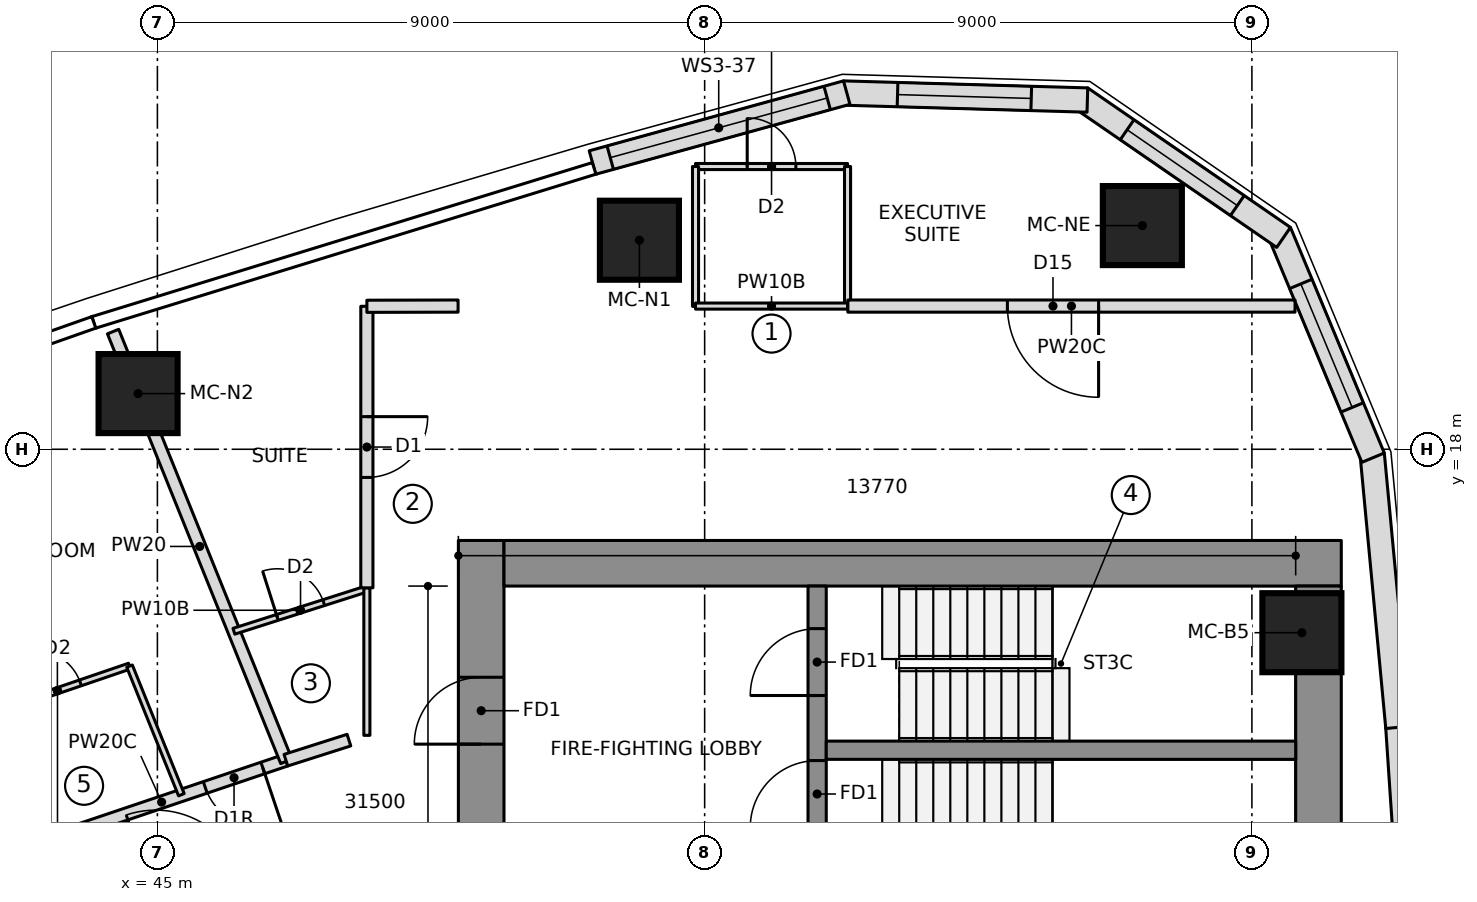
"""IFC4 building model, lengths in metres.
Left out: names, types, materials, properties, quantities, classifications, styles, units other than length and angle.
Written with IfcOpenShell. Run it as: python <this file> out.ifc"""

import sys

from ifc_helpers import new_model, si_unit, direction, frame, frame_2d, origin, origin_2d, place, context, subcontext, project, spatial, polyline, rectangle, outline, extrude, element, fill, save


model = new_model("IFC4")
c1 = context("Model", 3, precision=1e-05, world=origin(), true_north=direction((0.0, 1.0)))
c2 = subcontext(c1, "Body", "Model", "MODEL_VIEW")
j1 = project(units=[si_unit("LENGTHUNIT", "METRE"), si_unit("PLANEANGLEUNIT", "RADIAN")], contexts=[c1])
p1 = place(None, origin())
s1 = spatial("IfcSite", under=j1, at=p1, CompositionType="ELEMENT")
p2 = place(p1, origin())
s2 = spatial("IfcBuilding", under=s1, at=p2, CompositionType="ELEMENT")
p3 = place(p2, frame((0.0, 0.0, 179.05)))
s3 = spatial("IfcBuildingStorey", under=s2, at=p3, CompositionType="ELEMENT", Elevation=179.05)
p4 = place(p3, frame((50.325, 6.65, 0.0), z_axis=(0.0, 0.0, 1.0), x_axis=(0.0, 1.0, 0.0)))
e1 = element("IfcWall", 1, at=p4, inside=s3, PredefinedType="SHEAR", context=c2, shape_type="SweptSolid", body=[
    extrude(rectangle(XDim=9.85, YDim=0.75, at=frame_2d((4.925, 0.0))), origin(), (0.0, 0.0, 1.0), 3.55),
])
p5 = place(p4, frame((6.5, 0.0, 0.0)))
e2 = element("IfcOpeningElement", 2, at=p5, cuts=e1, PredefinedType="OPENING", context=c2, shape_type="SweptSolid", body=[
    extrude(rectangle(XDim=1.1, YDim=2.1, at=frame_2d((0.55, 1.05))), frame((0.0, 0.385, 0.0), z_axis=(0.0, -1.0, 0.0), x_axis=(1.0, 0.0, 0.0)), (0.0, 0.0, 1.0), 0.77),
])
p6 = place(p3, frame((50.7, 16.125, 0.0), z_axis=(0.0, 0.0, 1.0), x_axis=(1.0, 0.0, 0.0)))
e3 = element("IfcWall", 3, at=p6, inside=s3, PredefinedType="SHEAR", context=c2, shape_type="SweptSolid", body=[
    extrude(rectangle(XDim=13.77, YDim=0.75, at=frame_2d((6.885, 0.0))), origin(), (0.0, 0.0, 1.0), 3.55),
])
p7 = place(p3, frame((64.095, 8.099, 0.0), z_axis=(0.0, 0.0, 1.0), x_axis=(0.0, 1.0, 0.0)))
e4 = element("IfcWall", 4, at=p7, inside=s3, PredefinedType="SHEAR", context=c2, shape_type="SweptSolid", body=[
    extrude(rectangle(XDim=7.651, YDim=0.75, at=frame_2d((3.825, 0.0))), origin(), (0.0, 0.0, 1.0), 3.55),
])
p8 = place(p3, frame((55.85, 10.35, 0.0), z_axis=(0.0, 0.0, 1.0), x_axis=(0.0, 1.0, 0.0)))
e5 = element("IfcWall", 5, at=p8, inside=s3, PredefinedType="SHEAR", context=c2, shape_type="SweptSolid", body=[
    extrude(rectangle(XDim=5.4, YDim=0.3, at=frame_2d((2.7, 0.0))), origin(), (0.0, 0.0, 1.0), 3.55),
])
p9 = place(p8, frame((1.43, 0.0, 0.0)))
e6 = element("IfcOpeningElement", 6, at=p9, cuts=e5, PredefinedType="OPENING", context=c2, shape_type="SweptSolid", body=[
    extrude(rectangle(XDim=1.1, YDim=2.1, at=frame_2d((0.55, 1.05))), frame((0.0, 0.16, 0.0), z_axis=(0.0, -1.0, 0.0), x_axis=(1.0, 0.0, 0.0)), (0.0, 0.0, 1.0), 0.32),
])
p10 = place(p8, frame((3.6, 0.0, 0.0)))
e7 = element("IfcOpeningElement", 7, at=p10, cuts=e5, PredefinedType="OPENING", context=c2, shape_type="SweptSolid", body=[
    extrude(rectangle(XDim=1.1, YDim=2.1, at=frame_2d((0.55, 1.05))), frame((0.0, 0.16, 0.0), z_axis=(0.0, -1.0, 0.0), x_axis=(1.0, 0.0, 0.0)), (0.0, 0.0, 1.0), 0.32),
])
p11 = place(p3, frame((56.0, 13.05, 0.0), z_axis=(0.0, 0.0, 1.0), x_axis=(1.0, 0.0, 0.0)))
e8 = element("IfcWall", 8, at=p11, inside=s3, PredefinedType="SHEAR", context=c2, shape_type="SweptSolid", body=[
    extrude(rectangle(XDim=7.72, YDim=0.3, at=frame_2d((3.86, 0.0))), origin(), (0.0, 0.0, 1.0), 3.55),
])
for number, where, z_axis, x_axis in (
    (9, (63.822, 14.983, 0.0), (0.0, 0.0, 1.0), (1.0, 0.0, 0.0)),
    (10, (61.198, 21.679, 0.0), (0.0, 0.0, 1.0), (1.0, 0.0, 0.0)),
    (11, (52.927, 21.438, 0.0), (0.0, 0.0, 1.0), (1.0, 0.0, 0.0)),
    (12, (44.683, 18.916, 0.0), (0.0, 0.0, 1.0), (1.0, 0.0, 0.0)),
):
    element("IfcColumn", number, at=place(p3, frame(where, z_axis=z_axis, x_axis=x_axis)), inside=s3, PredefinedType="COLUMN", context=c2, shape_type="SweptSolid", body=[
        extrude(rectangle(XDim=1.3, YDim=1.3, at=origin_2d()), origin(), (0.0, 0.0, 1.0), 3.55),
    ])
p12 = place(p3, frame((65.7, 8.958, 0.0), z_axis=(0.0, 0.0, 1.0), x_axis=(-0.066905935948, 0.997759287471, 0.0)))
e13 = element("IfcWall", 13, at=p12, inside=s3, PredefinedType="NOTDEFINED", context=c2, shape_type="SweptSolid", body=[
    extrude(outline(polyline([(-0.003, -0.2), (4.484, -0.2), (4.478, 0.2), (0.003, 0.2), (-0.003, -0.2)])), origin(), (0.0, 0.0, 1.0), 3.25),
])
p13 = place(p3, frame((65.401, 13.429, 0.0), z_axis=(0.0, 0.0, 1.0), x_axis=(-0.093605694738, 0.995609348044, 0.0)))
e14 = element("IfcWall", 14, at=p13, inside=s3, PredefinedType="NOTDEFINED", context=c2, shape_type="SweptSolid", body=[
    extrude(outline(polyline([(-0.003, -0.2), (4.511, -0.2), (4.451, 0.2), (0.003, 0.2), (-0.003, -0.2)])), origin(), (0.0, 0.0, 1.0), 3.25),
])
p14 = place(p3, frame((64.981, 17.89, 0.0), z_axis=(0.0, 0.0, 1.0), x_axis=(-0.383997619794, 0.923334082547, 0.0)))
e15 = element("IfcWall", 15, at=p14, inside=s3, PredefinedType="NOTDEFINED", context=c2, shape_type="SweptSolid", body=[
    extrude(outline(polyline([(-0.03, -0.2), (3.988, -0.2), (3.87, 0.2), (0.03, 0.2), (-0.03, -0.2)])), origin(), (0.0, 0.0, 1.0), 3.25),
])
p15 = place(p14, frame((0.865, 0.0, 0.6)))
e16 = element("IfcOpeningElement", 16, at=p15, cuts=e15, PredefinedType="OPENING", context=c2, shape_type="SweptSolid", body=[
    extrude(outline(polyline([(0.0, 1.35), (0.084, 1.771), (0.322, 2.128), (0.679, 2.366), (1.1, 2.45), (1.521, 2.366), (1.878, 2.128), (2.116, 1.771), (2.2, 1.35), (2.2, 1.1), (2.116, 0.679), (1.878, 0.322), (1.521, 0.084), (1.1, 0.0), (0.679, 0.084), (0.322, 0.322), (0.084, 0.679), (0.0, 1.1), (0.0, 1.35)])), frame((0.0, 0.21, 0.0), z_axis=(0.0, -1.0, 0.0), x_axis=(1.0, 0.0, 0.0)), (0.0, 0.0, 1.0), 0.42),
])
p16 = place(p3, frame((63.472, 21.518, 0.0), z_axis=(0.0, 0.0, 1.0), x_axis=(-0.823806162588, 0.566871596115, 0.0)))
e17 = element("IfcWall", 17, at=p16, inside=s3, PredefinedType="NOTDEFINED", context=c2, shape_type="SweptSolid", body=[
    extrude(outline(polyline([(-0.059, -0.2), (3.988, -0.2), (3.87, 0.2), (0.059, 0.2), (-0.059, -0.2)])), origin(), (0.0, 0.0, 1.0), 3.25),
])
p17 = place(p16, frame((0.865, 0.0, 0.6)))
e18 = element("IfcOpeningElement", 18, at=p17, cuts=e17, PredefinedType="OPENING", context=c2, shape_type="SweptSolid", body=[
    extrude(outline(polyline([(0.0, 1.35), (0.084, 1.771), (0.322, 2.128), (0.679, 2.366), (1.1, 2.45), (1.521, 2.366), (1.878, 2.128), (2.116, 1.771), (2.2, 1.35), (2.2, 1.1), (2.116, 0.679), (1.878, 0.322), (1.521, 0.084), (1.1, 0.0), (0.679, 0.084), (0.322, 0.322), (0.084, 0.679), (0.0, 1.1), (0.0, 1.35)])), frame((0.0, 0.21, 0.0), z_axis=(0.0, -1.0, 0.0), x_axis=(1.0, 0.0, 0.0)), (0.0, 0.0, 1.0), 0.42),
])
p18 = place(p3, frame((60.236, 23.745, 0.0), z_axis=(0.0, 0.0, 1.0), x_axis=(-0.999587920197, 0.028705222472, 0.0)))
e19 = element("IfcWall", 19, at=p18, inside=s3, PredefinedType="NOTDEFINED", context=c2, shape_type="SweptSolid", body=[
    extrude(outline(polyline([(-0.059, -0.2), (3.959, -0.2), (3.9, 0.2), (0.059, 0.2), (-0.059, -0.2)])), origin(), (0.0, 0.0, 1.0), 3.25),
])
p19 = place(p18, frame((0.865, 0.0, 0.6)))
e20 = element("IfcOpeningElement", 20, at=p19, cuts=e19, PredefinedType="OPENING", context=c2, shape_type="SweptSolid", body=[
    extrude(outline(polyline([(0.0, 1.35), (0.084, 1.771), (0.322, 2.128), (0.679, 2.366), (1.1, 2.45), (1.521, 2.366), (1.878, 2.128), (2.116, 1.771), (2.2, 1.35), (2.2, 1.1), (2.116, 0.679), (1.878, 0.322), (1.521, 0.084), (1.1, 0.0), (0.679, 0.084), (0.322, 0.322), (0.084, 0.679), (0.0, 1.1), (0.0, 1.35)])), frame((0.0, 0.21, 0.0), z_axis=(0.0, -1.0, 0.0), x_axis=(1.0, 0.0, 0.0)), (0.0, 0.0, 1.0), 0.42),
])
p20 = place(p3, frame((56.308, 23.858, 0.0), z_axis=(0.0, 0.0, 1.0), x_axis=(-0.964205755089, -0.265155165617, 0.0)))
e21 = element("IfcWall", 21, at=p20, inside=s3, PredefinedType="NOTDEFINED", context=c2, shape_type="SweptSolid", body=[
    extrude(outline(polyline([(-0.03, -0.2), (4.307, -0.2), (4.307, 0.2), (0.03, 0.2), (-0.03, -0.2)])), origin(), (0.0, 0.0, 1.0), 3.25),
])
p21 = place(p20, frame((0.303, 0.0, 0.9)))
e22 = element("IfcOpeningElement", 22, at=p21, cuts=e21, PredefinedType="OPENING", context=c2, shape_type="SweptSolid", body=[
    extrude(rectangle(XDim=3.7, YDim=1.8, at=frame_2d((1.85, 0.9))), frame((0.0, 0.21, 0.0), z_axis=(0.0, -1.0, 0.0), x_axis=(1.0, 0.0, 0.0)), (0.0, 0.0, 1.0), 0.42),
])
p22 = place(p3, frame((53.85, 22.65, 0.0), z_axis=(0.0, 0.0, 1.0), x_axis=(1.0, 0.0, 0.0)))
e23 = element("IfcWall", 23, at=p22, inside=s3, PredefinedType="PARTITIONING", context=c2, shape_type="SweptSolid", body=[
    extrude(rectangle(XDim=2.5, YDim=0.1, at=frame_2d((1.25, 0.0))), origin(), (0.0, 0.0, 1.0), 3.25),
])
p23 = place(p22, frame((0.85, 0.0, 0.0)))
e24 = element("IfcOpeningElement", 24, at=p23, cuts=e23, PredefinedType="OPENING", context=c2, shape_type="SweptSolid", body=[
    extrude(rectangle(XDim=0.8, YDim=2.1, at=frame_2d((0.4, 1.05))), frame((0.0, 0.06, 0.0), z_axis=(0.0, -1.0, 0.0), x_axis=(1.0, 0.0, 0.0)), (0.0, 0.0, 1.0), 0.12),
])
for number, where, z_axis, x_axis in (
    (25, (56.35, 22.65, 0.0), (0.0, 0.0, 1.0), (0.0, -1.0, 0.0)),
    (26, (53.85, 20.35, 0.0), (0.0, 0.0, 1.0), (0.0, 1.0, 0.0)),
):
    element("IfcWall", number, at=place(p3, frame(where, z_axis=z_axis, x_axis=x_axis)), inside=s3, PredefinedType="PARTITIONING", context=c2, shape_type="SweptSolid", body=[
        extrude(rectangle(XDim=2.3, YDim=0.1, at=frame_2d((1.15, 0.0))), origin(), (0.0, 0.0, 1.0), 3.25),
    ])
p24 = place(p3, frame((47.113, 12.886, 0.0), z_axis=(0.0, 0.0, 1.0), x_axis=(-0.947550995841, -0.319604615549, 0.0)))
e27 = element("IfcWall", 27, at=p24, inside=s3, PredefinedType="PARTITIONING", context=c2, shape_type="SweptSolid", body=[
    extrude(rectangle(XDim=4.314, YDim=0.2, at=frame_2d((2.157, 0.0))), origin(), (0.0, 0.0, 1.0), 3.25),
])
p25 = place(p24, frame((0.4, 0.0, 0.0)))
e28 = element("IfcOpeningElement", 28, at=p25, cuts=e27, PredefinedType="OPENING", context=c2, shape_type="SweptSolid", body=[
    extrude(rectangle(XDim=1.0, YDim=2.1, at=frame_2d((0.5, 1.05))), frame((0.0, 0.11, 0.0), z_axis=(0.0, -1.0, 0.0), x_axis=(1.0, 0.0, 0.0)), (0.0, 0.0, 1.0), 0.22),
])
p26 = place(p3, frame((42.172, 13.625, 0.0), z_axis=(0.0, 0.0, 1.0), x_axis=(0.946406575113, 0.322977699822, 0.0)))
e29 = element("IfcWall", 29, at=p26, inside=s3, PredefinedType="PARTITIONING", context=c2, shape_type="SweptSolid", body=[
    extrude(rectangle(XDim=2.504, YDim=0.1, at=frame_2d((1.252, 0.0))), origin(), (0.0, 0.0, 1.0), 3.25),
])
p27 = place(p26, frame((0.85, 0.0, 0.0)))
e30 = element("IfcOpeningElement", 30, at=p27, cuts=e29, PredefinedType="OPENING", context=c2, shape_type="SweptSolid", body=[
    extrude(rectangle(XDim=0.8, YDim=2.1, at=frame_2d((0.4, 1.05))), frame((0.0, 0.06, 0.0), z_axis=(0.0, -1.0, 0.0), x_axis=(1.0, 0.0, 0.0)), (0.0, 0.0, 1.0), 0.12),
])
p28 = place(p3, frame((44.542, 14.434, 0.0), z_axis=(0.0, 0.0, 1.0), x_axis=(0.373917841166, -0.927461831052, 0.0)))
e31 = element("IfcWall", 31, at=p28, inside=s3, PredefinedType="PARTITIONING", context=c2, shape_type="SweptSolid", body=[
    extrude(rectangle(XDim=2.281, YDim=0.1, at=frame_2d((1.14, 0.0))), origin(), (0.0, 0.0, 1.0), 3.25),
])
p29 = place(p3, frame((47.121, 12.867, 0.0), z_axis=(0.0, 0.0, 1.0), x_axis=(-0.373907892596, 0.92746584188, 0.0)))
e32 = element("IfcWall", 32, at=p29, inside=s3, PredefinedType="PARTITIONING", context=c2, shape_type="SweptSolid", body=[
    extrude(rectangle(XDim=7.621, YDim=0.2, at=frame_2d((3.811, 0.0))), origin(), (0.0, 0.0, 1.0), 3.25),
])
p30 = place(p3, frame((46.259, 15.007, 0.0), z_axis=(0.0, 0.0, 1.0), x_axis=(0.952731222045, 0.303814447552, 0.0)))
e33 = element("IfcWall", 33, at=p30, inside=s3, PredefinedType="PARTITIONING", context=c2, shape_type="SweptSolid", body=[
    extrude(rectangle(XDim=2.277, YDim=0.1, at=frame_2d((1.138, 0.0))), origin(), (0.0, 0.0, 1.0), 3.25),
])
p31 = place(p30, frame((0.75, 0.0, 0.0)))
e34 = element("IfcOpeningElement", 34, at=p31, cuts=e33, PredefinedType="OPENING", context=c2, shape_type="SweptSolid", body=[
    extrude(rectangle(XDim=0.8, YDim=2.1, at=frame_2d((0.4, 1.05))), frame((0.0, 0.06, 0.0), z_axis=(0.0, -1.0, 0.0), x_axis=(1.0, 0.0, 0.0)), (0.0, 0.0, 1.0), 0.12),
])
p32 = place(p3, frame((63.709, 20.355, 0.0), z_axis=(0.0, 0.0, 1.0), x_axis=(-1.0, 0.0, 0.0)))
e35 = element("IfcWall", 35, at=p32, inside=s3, PredefinedType="PARTITIONING", context=c2, shape_type="SweptSolid", body=[
    extrude(rectangle(XDim=7.354, YDim=0.2, at=frame_2d((3.677, 0.0))), origin(), (0.0, 0.0, 1.0), 3.25),
])
p33 = place(p32, frame((3.231, 0.0, 0.0)))
e36 = element("IfcOpeningElement", 36, at=p33, cuts=e35, PredefinedType="OPENING", context=c2, shape_type="SweptSolid", body=[
    extrude(rectangle(XDim=1.5, YDim=2.1, at=frame_2d((0.75, 1.05))), frame((0.0, 0.11, 0.0), z_axis=(0.0, -1.0, 0.0), x_axis=(1.0, 0.0, 0.0)), (0.0, 0.0, 1.0), 0.22),
])
p34 = place(p3, frame((56.35, 20.355, 0.0), z_axis=(0.0, 0.0, 1.0), x_axis=(-1.0, 0.0, 0.0)))
e37 = element("IfcWall", 37, at=p34, inside=s3, PredefinedType="PARTITIONING", context=c2, shape_type="SweptSolid", body=[
    extrude(rectangle(XDim=2.5, YDim=0.1, at=frame_2d((1.25, 0.0))), origin(), (0.0, 0.0, 1.0), 3.25),
])
p35 = place(p3, frame((48.445, 15.721, 0.0), z_axis=(0.0, 0.0, 1.0), x_axis=(0.0, -1.0, 0.0)))
e38 = element("IfcWall", 38, at=p35, inside=s3, PredefinedType="PARTITIONING", context=c2, shape_type="SweptSolid", body=[
    extrude(rectangle(XDim=2.426, YDim=0.1, at=frame_2d((1.213, 0.0))), origin(), (0.0, 0.0, 1.0), 3.25),
])
p36 = place(p3, frame((48.15, 13.217, 0.0), z_axis=(0.0, 0.0, 1.0), x_axis=(-0.952731090451, -0.303814860215, 0.0)))
e39 = element("IfcWall", 39, at=p36, inside=s3, PredefinedType="PARTITIONING", context=c2, shape_type="SweptSolid", body=[
    extrude(rectangle(XDim=1.088, YDim=0.2, at=frame_2d((0.544, 0.0))), origin(), (0.0, 0.0, 1.0), 3.25),
])
p37 = place(p3, frame((48.445, 20.352, 0.0), z_axis=(0.0, 0.0, 1.0), x_axis=(-5.2725931e-05, -0.99999999861, 0.0)))
e40 = element("IfcWall", 40, at=p37, inside=s3, PredefinedType="PARTITIONING", context=c2, shape_type="SweptSolid", body=[
    extrude(rectangle(XDim=4.63, YDim=0.2, at=frame_2d((2.315, 0.0))), origin(), (0.0, 0.0, 1.0), 3.25),
])
p38 = place(p37, frame((1.815, 0.0, 0.0)))
e41 = element("IfcOpeningElement", 41, at=p38, cuts=e40, PredefinedType="OPENING", context=c2, shape_type="SweptSolid", body=[
    extrude(rectangle(XDim=1.0, YDim=2.1, at=frame_2d((0.5, 1.05))), frame((0.0, 0.11, 0.0), z_axis=(0.0, -1.0, 0.0), x_axis=(1.0, 0.0, 0.0)), (0.0, 0.0, 1.0), 0.22),
])
p39 = place(p3, frame((49.945, 20.355, 0.0), z_axis=(0.0, 0.0, 1.0), x_axis=(-0.999997403051, -0.002279010849, 0.0)))
e42 = element("IfcWall", 42, at=p39, inside=s3, PredefinedType="PARTITIONING", context=c2, shape_type="SweptSolid", body=[
    extrude(rectangle(XDim=1.5, YDim=0.2, at=frame_2d((0.75, 0.0))), origin(), (0.0, 0.0, 1.0), 3.25),
])
p40 = place(p15, origin())
e43 = element("IfcWindow", 43, at=p40, inside=s3, PartitioningType="SINGLE_PANEL", PredefinedType="WINDOW", context=c2, shape_type="SweptSolid", body=[
    extrude(outline(polyline([(0.0, 1.35), (0.084, 1.771), (0.322, 2.128), (0.679, 2.366), (1.1, 2.45), (1.521, 2.366), (1.878, 2.128), (2.116, 1.771), (2.2, 1.35), (2.2, 1.1), (2.116, 0.679), (1.878, 0.322), (1.521, 0.084), (1.1, 0.0), (0.679, 0.084), (0.322, 0.322), (0.084, 0.679), (0.0, 1.1), (0.0, 1.35)])), frame((0.0, 0.17, 0.0), z_axis=(0.0, -1.0, 0.0), x_axis=(1.0, 0.0, 0.0)), (0.0, 0.0, 1.0), 0.06),
])
fill(e16, e43)
p41 = place(p17, origin())
e44 = element("IfcWindow", 44, at=p41, inside=s3, PartitioningType="SINGLE_PANEL", PredefinedType="WINDOW", context=c2, shape_type="SweptSolid", body=[
    extrude(outline(polyline([(0.0, 1.35), (0.084, 1.771), (0.322, 2.128), (0.679, 2.366), (1.1, 2.45), (1.521, 2.366), (1.878, 2.128), (2.116, 1.771), (2.2, 1.35), (2.2, 1.1), (2.116, 0.679), (1.878, 0.322), (1.521, 0.084), (1.1, 0.0), (0.679, 0.084), (0.322, 0.322), (0.084, 0.679), (0.0, 1.1), (0.0, 1.35)])), frame((0.0, 0.17, 0.0), z_axis=(0.0, -1.0, 0.0), x_axis=(1.0, 0.0, 0.0)), (0.0, 0.0, 1.0), 0.06),
])
fill(e18, e44)
p42 = place(p19, origin())
e45 = element("IfcWindow", 45, at=p42, inside=s3, PartitioningType="SINGLE_PANEL", PredefinedType="WINDOW", context=c2, shape_type="SweptSolid", body=[
    extrude(outline(polyline([(0.0, 1.35), (0.084, 1.771), (0.322, 2.128), (0.679, 2.366), (1.1, 2.45), (1.521, 2.366), (1.878, 2.128), (2.116, 1.771), (2.2, 1.35), (2.2, 1.1), (2.116, 0.679), (1.878, 0.322), (1.521, 0.084), (1.1, 0.0), (0.679, 0.084), (0.322, 0.322), (0.084, 0.679), (0.0, 1.1), (0.0, 1.35)])), frame((0.0, 0.17, 0.0), z_axis=(0.0, -1.0, 0.0), x_axis=(1.0, 0.0, 0.0)), (0.0, 0.0, 1.0), 0.06),
])
fill(e20, e45)
p43 = place(p21, origin())
e46 = element("IfcWindow", 46, at=p43, inside=s3, PartitioningType="SINGLE_PANEL", PredefinedType="WINDOW", context=c2, shape_type="SweptSolid", body=[
    extrude(rectangle(XDim=3.7, YDim=1.8, at=frame_2d((1.85, 0.9))), frame((0.0, 0.17, 0.0), z_axis=(0.0, -1.0, 0.0), x_axis=(1.0, 0.0, 0.0)), (0.0, 0.0, 1.0), 0.06),
])
fill(e22, e46)
p44 = place(p23, origin())
e47 = element("IfcDoor", 47, at=p44, inside=s3, OperationType="SINGLE_SWING_LEFT", PredefinedType="DOOR", context=c2, shape_type="SweptSolid", body=[
    extrude(rectangle(XDim=0.8, YDim=2.1, at=frame_2d((0.4, 1.05))), frame((0.0, 0.025, 0.0), z_axis=(0.0, -1.0, 0.0), x_axis=(1.0, 0.0, 0.0)), (0.0, 0.0, 1.0), 0.05),
])
fill(e24, e47)
p45 = place(p27, origin())
e48 = element("IfcDoor", 48, at=p45, inside=s3, OperationType="SINGLE_SWING_LEFT", PredefinedType="DOOR", context=c2, shape_type="SweptSolid", body=[
    extrude(rectangle(XDim=0.8, YDim=2.1, at=frame_2d((0.4, 1.05))), frame((0.0, 0.025, 0.0), z_axis=(0.0, -1.0, 0.0), x_axis=(1.0, 0.0, 0.0)), (0.0, 0.0, 1.0), 0.05),
])
fill(e30, e48)
p46 = place(p25, origin())
e49 = element("IfcDoor", 49, at=p46, inside=s3, OperationType="SINGLE_SWING_RIGHT", PredefinedType="DOOR", context=c2, shape_type="SweptSolid", body=[
    extrude(rectangle(XDim=1.0, YDim=2.1, at=frame_2d((0.5, 1.05))), frame((0.0, 0.025, 0.0), z_axis=(0.0, -1.0, 0.0), x_axis=(1.0, 0.0, 0.0)), (0.0, 0.0, 1.0), 0.05),
])
fill(e28, e49)
p47 = place(p31, origin())
e50 = element("IfcDoor", 50, at=p47, inside=s3, OperationType="SINGLE_SWING_LEFT", PredefinedType="DOOR", context=c2, shape_type="SweptSolid", body=[
    extrude(rectangle(XDim=0.8, YDim=2.1, at=frame_2d((0.4, 1.05))), frame((0.0, 0.025, 0.0), z_axis=(0.0, -1.0, 0.0), x_axis=(1.0, 0.0, 0.0)), (0.0, 0.0, 1.0), 0.05),
])
fill(e34, e50)
p48 = place(p33, origin())
e51 = element("IfcDoor", 51, at=p48, inside=s3, OperationType="DOUBLE_DOOR_SINGLE_SWING", PredefinedType="DOOR", context=c2, shape_type="SweptSolid", body=[
    extrude(rectangle(XDim=1.5, YDim=2.1, at=frame_2d((0.75, 1.05))), frame((0.0, 0.025, 0.0), z_axis=(0.0, -1.0, 0.0), x_axis=(1.0, 0.0, 0.0)), (0.0, 0.0, 1.0), 0.05),
])
fill(e36, e51)
p49 = place(p38, origin())
e52 = element("IfcDoor", 52, at=p49, inside=s3, OperationType="SINGLE_SWING_LEFT", PredefinedType="DOOR", context=c2, shape_type="SweptSolid", body=[
    extrude(rectangle(XDim=1.0, YDim=2.1, at=frame_2d((0.5, 1.05))), frame((0.0, 0.025, 0.0), z_axis=(0.0, -1.0, 0.0), x_axis=(1.0, 0.0, 0.0)), (0.0, 0.0, 1.0), 0.05),
])
fill(e41, e52)
p50 = place(p9, origin())
e53 = element("IfcDoor", 53, at=p50, inside=s3, OperationType="SINGLE_SWING_RIGHT", PredefinedType="DOOR", context=c2, shape_type="SweptSolid", body=[
    extrude(rectangle(XDim=1.1, YDim=2.1, at=frame_2d((0.55, 1.05))), frame((0.0, 0.025, 0.0), z_axis=(0.0, -1.0, 0.0), x_axis=(1.0, 0.0, 0.0)), (0.0, 0.0, 1.0), 0.05),
])
fill(e6, e53)
p51 = place(p10, origin())
e54 = element("IfcDoor", 54, at=p51, inside=s3, OperationType="SINGLE_SWING_RIGHT", PredefinedType="DOOR", context=c2, shape_type="SweptSolid", body=[
    extrude(rectangle(XDim=1.1, YDim=2.1, at=frame_2d((0.55, 1.05))), frame((0.0, 0.025, 0.0), z_axis=(0.0, -1.0, 0.0), x_axis=(1.0, 0.0, 0.0)), (0.0, 0.0, 1.0), 0.05),
])
fill(e7, e54)
p52 = place(p5, origin())
e55 = element("IfcDoor", 55, at=p52, inside=s3, OperationType="SINGLE_SWING_RIGHT", PredefinedType="DOOR", context=c2, shape_type="SweptSolid", body=[
    extrude(rectangle(XDim=1.1, YDim=2.1, at=frame_2d((0.55, 1.05))), frame((0.0, 0.025, 0.0), z_axis=(0.0, -1.0, 0.0), x_axis=(1.0, 0.0, 0.0)), (0.0, 0.0, 1.0), 0.05),
])
fill(e2, e55)
save(model, sys.argv[1])
